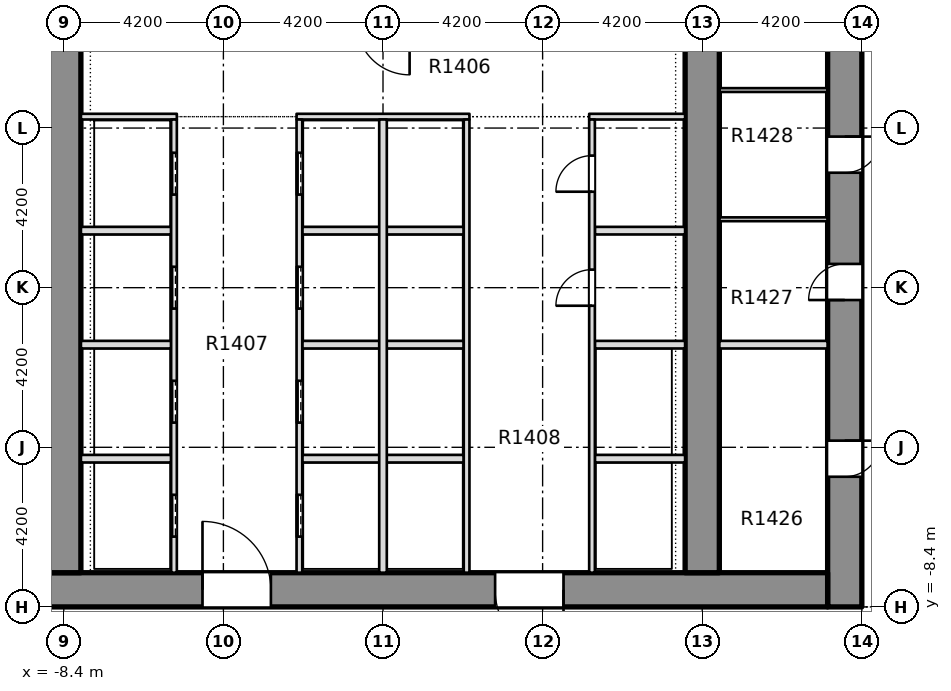
"""IFC4 building model, lengths in metres.
Left out: names, types, materials, properties, quantities, classifications, styles, units other than length and angle.
Written with IfcOpenShell. Run it as: python <this file> out.ifc"""

import sys

from ifc_helpers import new_model, si_unit, direction, frame, frame_2d, origin, place, context, subcontext, project, spatial, rectangle, extrude, element, fill, save


model = new_model("IFC4")
c1 = context("Model", 3, precision=1e-05, world=origin(), true_north=direction((0.0, 1.0)))
c2 = subcontext(c1, "Body", "Model", "MODEL_VIEW")
j1 = project(units=[si_unit("LENGTHUNIT", "METRE"), si_unit("PLANEANGLEUNIT", "RADIAN")], contexts=[c1])
p1 = place(None, origin())
s1 = spatial("IfcSite", under=j1, at=p1, CompositionType="ELEMENT")
p2 = place(p1, origin())
s2 = spatial("IfcBuilding", under=s1, at=p2, CompositionType="ELEMENT")
p3 = place(p2, frame((0.0, 0.0, 62.1)))
s3 = spatial("IfcBuildingStorey", under=s2, at=p3, CompositionType="ELEMENT", Elevation=62.1)
p4 = place(p3, frame((12.15, -8.4, -0.32), z_axis=(0.0, 0.0, 1.0), x_axis=(0.0, 1.0, 0.0)))
e1 = element("IfcWall", 1, at=p4, inside=s3, PredefinedType="SHEAR", context=c2, shape_type="SweptSolid", body=[
    extrude(rectangle(XDim=30.15, YDim=0.9, at=frame_2d((15.075, 0.0))), origin(), (0.0, 0.0, 1.0), 3.45),
])
p5 = place(p4, frame((3.425, 0.0, 0.32)))
e2 = element("IfcOpeningElement", 2, at=p5, cuts=e1, PredefinedType="OPENING", context=c2, shape_type="SweptSolid", body=[
    extrude(rectangle(XDim=0.95, YDim=2.1, at=frame_2d((0.475, 1.05))), frame((0.0, 0.46, 0.0), z_axis=(0.0, -1.0, 0.0), x_axis=(1.0, 0.0, 0.0)), (0.0, 0.0, 1.0), 0.92),
])
p6 = place(p4, frame((8.075, 0.0, 0.32)))
e3 = element("IfcOpeningElement", 3, at=p6, cuts=e1, PredefinedType="OPENING", context=c2, shape_type="SweptSolid", body=[
    extrude(rectangle(XDim=0.95, YDim=2.1, at=frame_2d((0.475, 1.05))), frame((0.0, 0.46, 0.0), z_axis=(0.0, -1.0, 0.0), x_axis=(1.0, 0.0, 0.0)), (0.0, 0.0, 1.0), 0.92),
])
p7 = place(p4, frame((11.425, 0.0, 0.32)))
e4 = element("IfcOpeningElement", 4, at=p7, cuts=e1, PredefinedType="OPENING", context=c2, shape_type="SweptSolid", body=[
    extrude(rectangle(XDim=0.95, YDim=2.1, at=frame_2d((0.475, 1.05))), frame((0.0, 0.46, 0.0), z_axis=(0.0, -1.0, 0.0), x_axis=(1.0, 0.0, 0.0)), (0.0, 0.0, 1.0), 0.92),
])
p8 = place(p4, frame((15.625, 0.0, 0.32)))
e5 = element("IfcOpeningElement", 5, at=p8, cuts=e1, PredefinedType="OPENING", context=c2, shape_type="SweptSolid", body=[
    extrude(rectangle(XDim=0.95, YDim=2.1, at=frame_2d((0.475, 1.05))), frame((0.0, 0.46, 0.0), z_axis=(0.0, -1.0, 0.0), x_axis=(1.0, 0.0, 0.0)), (0.0, 0.0, 1.0), 0.92),
])
p9 = place(p4, frame((22.725, 0.0, 0.32)))
e6 = element("IfcOpeningElement", 6, at=p9, cuts=e1, PredefinedType="OPENING", context=c2, shape_type="SweptSolid", body=[
    extrude(rectangle(XDim=0.95, YDim=2.1, at=frame_2d((0.475, 1.05))), frame((0.0, 0.46, 0.0), z_axis=(0.0, -1.0, 0.0), x_axis=(1.0, 0.0, 0.0)), (0.0, 0.0, 1.0), 0.92),
])
p10 = place(p4, frame((26.75, 0.0, 0.32)))
e7 = element("IfcOpeningElement", 7, at=p10, cuts=e1, PredefinedType="OPENING", context=c2, shape_type="SweptSolid", body=[
    extrude(rectangle(XDim=0.95, YDim=2.1, at=frame_2d((0.475, 1.05))), frame((0.0, 0.46, 0.0), z_axis=(0.0, -1.0, 0.0), x_axis=(1.0, 0.0, 0.0)), (0.0, 0.0, 1.0), 0.92),
])
p11 = place(p4, frame((19.3, 0.0, 0.32)))
e8 = element("IfcOpeningElement", 8, at=p11, cuts=e1, PredefinedType="OPENING", context=c2, shape_type="SweptSolid", body=[
    extrude(rectangle(XDim=1.2, YDim=2.1, at=frame_2d((0.6, 1.05))), frame((0.0, 0.46, 0.0), z_axis=(0.0, -1.0, 0.0), x_axis=(1.0, 0.0, 0.0)), (0.0, 0.0, 1.0), 0.92),
])
p12 = place(p3, frame((-11.7, -7.95, -0.32), z_axis=(0.0, 0.0, 1.0), x_axis=(1.0, 0.0, 0.0)))
e9 = element("IfcWall", 9, at=p12, inside=s3, PredefinedType="SHEAR", context=c2, shape_type="SweptSolid", body=[
    extrude(rectangle(XDim=23.4, YDim=0.9, at=frame_2d((11.7, 0.0))), origin(), (0.0, 0.0, 1.0), 3.45),
])
p13 = place(p12, frame((6.95, 0.0, 0.32)))
e10 = element("IfcOpeningElement", 10, at=p13, cuts=e9, PredefinedType="OPENING", context=c2, shape_type="SweptSolid", body=[
    extrude(rectangle(XDim=1.8, YDim=2.1, at=frame_2d((0.9, 1.05))), frame((0.0, 0.46, 0.0), z_axis=(0.0, -1.0, 0.0), x_axis=(1.0, 0.0, 0.0)), (0.0, 0.0, 1.0), 0.92),
])
p14 = place(p12, frame((14.65, 0.0, 0.32)))
e11 = element("IfcOpeningElement", 11, at=p14, cuts=e9, PredefinedType="OPENING", context=c2, shape_type="SweptSolid", body=[
    extrude(rectangle(XDim=1.8, YDim=2.1, at=frame_2d((0.9, 1.05))), frame((0.0, 0.46, 0.0), z_axis=(0.0, -1.0, 0.0), x_axis=(1.0, 0.0, 0.0)), (0.0, 0.0, 1.0), 0.92),
])
p15 = place(p3, frame((-8.4, -7.5, -0.32), z_axis=(0.0, 0.0, 1.0), x_axis=(0.0, 1.0, 0.0)))
e12 = element("IfcWall", 12, at=p15, inside=s3, PredefinedType="SHEAR", context=c2, shape_type="SweptSolid", body=[
    extrude(rectangle(XDim=28.35, YDim=0.9, at=frame_2d((14.175, 0.0))), origin(), (0.0, 0.0, 1.0), 3.45),
])
p16 = place(p15, frame((18.4, 0.0, 0.32)))
e13 = element("IfcOpeningElement", 13, at=p16, cuts=e12, PredefinedType="OPENING", context=c2, shape_type="SweptSolid", body=[
    extrude(rectangle(XDim=1.2, YDim=2.1, at=frame_2d((0.6, 1.05))), frame((0.0, 0.46, 0.0), z_axis=(0.0, -1.0, 0.0), x_axis=(1.0, 0.0, 0.0)), (0.0, 0.0, 1.0), 0.92),
])
p17 = place(p3, frame((8.4, -7.5, -0.32), z_axis=(0.0, 0.0, 1.0), x_axis=(0.0, 1.0, 0.0)))
e14 = element("IfcWall", 14, at=p17, inside=s3, PredefinedType="SHEAR", context=c2, shape_type="SweptSolid", body=[
    extrude(rectangle(XDim=28.35, YDim=0.9, at=frame_2d((14.175, 0.0))), origin(), (0.0, 0.0, 1.0), 3.45),
])
p18 = place(p17, frame((18.4, 0.0, 0.32)))
e15 = element("IfcOpeningElement", 15, at=p18, cuts=e14, PredefinedType="OPENING", context=c2, shape_type="SweptSolid", body=[
    extrude(rectangle(XDim=1.2, YDim=2.1, at=frame_2d((0.6, 1.05))), frame((0.0, 0.46, 0.0), z_axis=(0.0, -1.0, 0.0), x_axis=(1.0, 0.0, 0.0)), (0.0, 0.0, 1.0), 0.92),
])
p19 = place(p3, frame((-7.949, -4.5, 0.0), z_axis=(0.0, 0.0, 1.0), x_axis=(1.0, 0.0, 0.0)))
e16 = element("IfcWall", 16, at=p19, inside=s3, PredefinedType="PARTITIONING", context=c2, shape_type="SweptSolid", body=[
    extrude(rectangle(XDim=2.374, YDim=0.2, at=frame_2d((1.187, 0.0))), origin(), (0.0, 0.0, 1.0), 3.13),
])
p20 = place(p3, frame((-2.125, -4.5, 0.0), z_axis=(0.0, 0.0, 1.0), x_axis=(1.0, 0.0, 0.0)))
e17 = element("IfcWall", 17, at=p20, inside=s3, PredefinedType="PARTITIONING", context=c2, shape_type="SweptSolid", body=[
    extrude(rectangle(XDim=4.25, YDim=0.2, at=frame_2d((2.125, 0.0))), origin(), (0.0, 0.0, 1.0), 3.13),
])
for number, where, z_axis, x_axis in (
    (18, (5.575, -4.5, 0.0), (0.0, 0.0, 1.0), (1.0, 0.0, 0.0)),
    (19, (-7.949, -1.5, 0.0), (0.0, 0.0, 1.0), (1.0, 0.0, 0.0)),
):
    element("IfcWall", number, at=place(p3, frame(where, z_axis=z_axis, x_axis=x_axis)), inside=s3, PredefinedType="PARTITIONING", context=c2, shape_type="SweptSolid", body=[
        extrude(rectangle(XDim=2.374, YDim=0.2, at=frame_2d((1.187, 0.0))), origin(), (0.0, 0.0, 1.0), 3.13),
    ])
p21 = place(p3, frame((-2.125, -1.5, 0.0), z_axis=(0.0, 0.0, 1.0), x_axis=(1.0, 0.0, 0.0)))
e20 = element("IfcWall", 20, at=p21, inside=s3, PredefinedType="PARTITIONING", context=c2, shape_type="SweptSolid", body=[
    extrude(rectangle(XDim=4.25, YDim=0.2, at=frame_2d((2.125, 0.0))), origin(), (0.0, 0.0, 1.0), 3.13),
])
for number, where, z_axis, x_axis in (
    (21, (5.575, -1.5, 0.0), (0.0, 0.0, 1.0), (1.0, 0.0, 0.0)),
    (22, (-7.949, 1.5, 0.0), (0.0, 0.0, 1.0), (1.0, 0.0, 0.0)),
):
    element("IfcWall", number, at=place(p3, frame(where, z_axis=z_axis, x_axis=x_axis)), inside=s3, PredefinedType="PARTITIONING", context=c2, shape_type="SweptSolid", body=[
        extrude(rectangle(XDim=2.374, YDim=0.2, at=frame_2d((1.187, 0.0))), origin(), (0.0, 0.0, 1.0), 3.13),
    ])
p22 = place(p3, frame((-2.125, 1.5, 0.0), z_axis=(0.0, 0.0, 1.0), x_axis=(1.0, 0.0, 0.0)))
e23 = element("IfcWall", 23, at=p22, inside=s3, PredefinedType="PARTITIONING", context=c2, shape_type="SweptSolid", body=[
    extrude(rectangle(XDim=4.25, YDim=0.2, at=frame_2d((2.125, 0.0))), origin(), (0.0, 0.0, 1.0), 3.13),
])
p23 = place(p3, frame((5.575, 1.5, 0.0), z_axis=(0.0, 0.0, 1.0), x_axis=(1.0, 0.0, 0.0)))
e24 = element("IfcWall", 24, at=p23, inside=s3, PredefinedType="PARTITIONING", context=c2, shape_type="SweptSolid", body=[
    extrude(rectangle(XDim=2.374, YDim=0.2, at=frame_2d((1.187, 0.0))), origin(), (0.0, 0.0, 1.0), 3.13),
])
p24 = place(p3, frame((-7.949, 4.5, 0.0), z_axis=(0.0, 0.0, 1.0), x_axis=(1.0, 0.0, 0.0)))
e25 = element("IfcWall", 25, at=p24, inside=s3, PredefinedType="PARTITIONING", context=c2, shape_type="SweptSolid", body=[
    extrude(rectangle(XDim=2.524, YDim=0.15, at=frame_2d((1.262, 0.0))), origin(), (0.0, 0.0, 1.0), 3.13),
])
p25 = place(p3, frame((-2.275, 4.5, 0.0), z_axis=(0.0, 0.0, 1.0), x_axis=(1.0, 0.0, 0.0)))
e26 = element("IfcWall", 26, at=p25, inside=s3, PredefinedType="PARTITIONING", context=c2, shape_type="SweptSolid", body=[
    extrude(rectangle(XDim=4.55, YDim=0.15, at=frame_2d((2.275, 0.0))), origin(), (0.0, 0.0, 1.0), 3.13),
])
p26 = place(p3, frame((5.425, 4.5, 0.0), z_axis=(0.0, 0.0, 1.0), x_axis=(1.0, 0.0, 0.0)))
e27 = element("IfcWall", 27, at=p26, inside=s3, PredefinedType="PARTITIONING", context=c2, shape_type="SweptSolid", body=[
    extrude(rectangle(XDim=2.524, YDim=0.15, at=frame_2d((1.262, 0.0))), origin(), (0.0, 0.0, 1.0), 3.13),
])
p27 = place(p3, frame((-5.5, -7.499, 0.0), z_axis=(0.0, 0.0, 1.0), x_axis=(0.0, 1.0, 0.0)))
e28 = element("IfcWall", 28, at=p27, inside=s3, PredefinedType="PARTITIONING", context=c2, shape_type="SweptSolid", body=[
    extrude(rectangle(XDim=11.924, YDim=0.15, at=frame_2d((5.962, 0.0))), origin(), (0.0, 0.0, 1.0), 3.13),
])
p28 = place(p27, frame((0.949, 0.0, 0.0)))
e29 = element("IfcOpeningElement", 29, at=p28, cuts=e28, PredefinedType="OPENING", context=c2, shape_type="SweptSolid", body=[
    extrude(rectangle(XDim=1.1, YDim=2.1, at=frame_2d((0.55, 1.05))), frame((0.0, 0.085, 0.0), z_axis=(0.0, -1.0, 0.0), x_axis=(1.0, 0.0, 0.0)), (0.0, 0.0, 1.0), 0.17),
])
p29 = place(p27, frame((3.949, 0.0, 0.0)))
e30 = element("IfcOpeningElement", 30, at=p29, cuts=e28, PredefinedType="OPENING", context=c2, shape_type="SweptSolid", body=[
    extrude(rectangle(XDim=1.1, YDim=2.1, at=frame_2d((0.55, 1.05))), frame((0.0, 0.085, 0.0), z_axis=(0.0, -1.0, 0.0), x_axis=(1.0, 0.0, 0.0)), (0.0, 0.0, 1.0), 0.17),
])
p30 = place(p27, frame((6.949, 0.0, 0.0)))
e31 = element("IfcOpeningElement", 31, at=p30, cuts=e28, PredefinedType="OPENING", context=c2, shape_type="SweptSolid", body=[
    extrude(rectangle(XDim=1.1, YDim=2.1, at=frame_2d((0.55, 1.05))), frame((0.0, 0.085, 0.0), z_axis=(0.0, -1.0, 0.0), x_axis=(1.0, 0.0, 0.0)), (0.0, 0.0, 1.0), 0.17),
])
p31 = place(p27, frame((9.949, 0.0, 0.0)))
e32 = element("IfcOpeningElement", 32, at=p31, cuts=e28, PredefinedType="OPENING", context=c2, shape_type="SweptSolid", body=[
    extrude(rectangle(XDim=1.1, YDim=2.1, at=frame_2d((0.55, 1.05))), frame((0.0, 0.085, 0.0), z_axis=(0.0, -1.0, 0.0), x_axis=(1.0, 0.0, 0.0)), (0.0, 0.0, 1.0), 0.17),
])
p32 = place(p3, frame((-2.2, -7.499, 0.0), z_axis=(0.0, 0.0, 1.0), x_axis=(0.0, 1.0, 0.0)))
e33 = element("IfcWall", 33, at=p32, inside=s3, PredefinedType="PARTITIONING", context=c2, shape_type="SweptSolid", body=[
    extrude(rectangle(XDim=11.924, YDim=0.15, at=frame_2d((5.962, 0.0))), origin(), (0.0, 0.0, 1.0), 3.13),
])
p33 = place(p32, frame((0.949, 0.0, 0.0)))
e34 = element("IfcOpeningElement", 34, at=p33, cuts=e33, PredefinedType="OPENING", context=c2, shape_type="SweptSolid", body=[
    extrude(rectangle(XDim=1.1, YDim=2.1, at=frame_2d((0.55, 1.05))), frame((0.0, 0.085, 0.0), z_axis=(0.0, -1.0, 0.0), x_axis=(1.0, 0.0, 0.0)), (0.0, 0.0, 1.0), 0.17),
])
p34 = place(p32, frame((3.949, 0.0, 0.0)))
e35 = element("IfcOpeningElement", 35, at=p34, cuts=e33, PredefinedType="OPENING", context=c2, shape_type="SweptSolid", body=[
    extrude(rectangle(XDim=1.1, YDim=2.1, at=frame_2d((0.55, 1.05))), frame((0.0, 0.085, 0.0), z_axis=(0.0, -1.0, 0.0), x_axis=(1.0, 0.0, 0.0)), (0.0, 0.0, 1.0), 0.17),
])
p35 = place(p32, frame((6.949, 0.0, 0.0)))
e36 = element("IfcOpeningElement", 36, at=p35, cuts=e33, PredefinedType="OPENING", context=c2, shape_type="SweptSolid", body=[
    extrude(rectangle(XDim=1.1, YDim=2.1, at=frame_2d((0.55, 1.05))), frame((0.0, 0.085, 0.0), z_axis=(0.0, -1.0, 0.0), x_axis=(1.0, 0.0, 0.0)), (0.0, 0.0, 1.0), 0.17),
])
p36 = place(p32, frame((9.949, 0.0, 0.0)))
e37 = element("IfcOpeningElement", 37, at=p36, cuts=e33, PredefinedType="OPENING", context=c2, shape_type="SweptSolid", body=[
    extrude(rectangle(XDim=1.1, YDim=2.1, at=frame_2d((0.55, 1.05))), frame((0.0, 0.085, 0.0), z_axis=(0.0, -1.0, 0.0), x_axis=(1.0, 0.0, 0.0)), (0.0, 0.0, 1.0), 0.17),
])
p37 = place(p3, frame((0.0, -7.499, 0.0), z_axis=(0.0, 0.0, 1.0), x_axis=(0.0, 1.0, 0.0)))
e38 = element("IfcWall", 38, at=p37, inside=s3, PredefinedType="PARTITIONING", context=c2, shape_type="SweptSolid", body=[
    extrude(rectangle(XDim=11.924, YDim=0.2, at=frame_2d((5.962, 0.0))), origin(), (0.0, 0.0, 1.0), 3.13),
])
p38 = place(p3, frame((2.2, -7.499, 0.0), z_axis=(0.0, 0.0, 1.0), x_axis=(0.0, 1.0, 0.0)))
e39 = element("IfcWall", 39, at=p38, inside=s3, PredefinedType="PARTITIONING", context=c2, shape_type="SweptSolid", body=[
    extrude(rectangle(XDim=11.924, YDim=0.15, at=frame_2d((5.962, 0.0))), origin(), (0.0, 0.0, 1.0), 3.13),
])
p39 = place(p3, frame((5.5, -7.499, 0.0), z_axis=(0.0, 0.0, 1.0), x_axis=(0.0, 1.0, 0.0)))
e40 = element("IfcWall", 40, at=p39, inside=s3, PredefinedType="PARTITIONING", context=c2, shape_type="SweptSolid", body=[
    extrude(rectangle(XDim=11.924, YDim=0.15, at=frame_2d((5.962, 0.0))), origin(), (0.0, 0.0, 1.0), 3.13),
])
p40 = place(p39, frame((7.024, 0.0, 0.0)))
e41 = element("IfcOpeningElement", 41, at=p40, cuts=e40, PredefinedType="OPENING", context=c2, shape_type="SweptSolid", body=[
    extrude(rectangle(XDim=0.95, YDim=2.1, at=frame_2d((0.475, 1.05))), frame((0.0, 0.085, 0.0), z_axis=(0.0, -1.0, 0.0), x_axis=(1.0, 0.0, 0.0)), (0.0, 0.0, 1.0), 0.17),
])
p41 = place(p39, frame((10.024, 0.0, 0.0)))
e42 = element("IfcOpeningElement", 42, at=p41, cuts=e40, PredefinedType="OPENING", context=c2, shape_type="SweptSolid", body=[
    extrude(rectangle(XDim=0.95, YDim=2.1, at=frame_2d((0.475, 1.05))), frame((0.0, 0.085, 0.0), z_axis=(0.0, -1.0, 0.0), x_axis=(1.0, 0.0, 0.0)), (0.0, 0.0, 1.0), 0.17),
])
p42 = place(p3, frame((8.851, -1.5, 0.0), z_axis=(0.0, 0.0, 1.0), x_axis=(1.0, 0.0, 0.0)))
e43 = element("IfcWall", 43, at=p42, inside=s3, PredefinedType="PARTITIONING", context=c2, shape_type="SweptSolid", body=[
    extrude(rectangle(XDim=2.848, YDim=0.2, at=frame_2d((1.424, 0.0))), origin(), (0.0, 0.0, 1.0), 3.13),
])
for number, where, z_axis, x_axis in (
    (44, (8.851, 1.8, 0.0), (0.0, 0.0, 1.0), (1.0, 0.0, 0.0)),
    (45, (8.851, 5.2, 0.0), (0.0, 0.0, 1.0), (1.0, 0.0, 0.0)),
):
    element("IfcWall", number, at=place(p3, frame(where, z_axis=z_axis, x_axis=x_axis)), inside=s3, PredefinedType="PARTITIONING", context=c2, shape_type="SweptSolid", body=[
        extrude(rectangle(XDim=2.848, YDim=0.1, at=frame_2d((1.424, 0.0))), origin(), (0.0, 0.0, 1.0), 3.13),
    ])
p43 = place(p28, origin())
e46 = element("IfcDoor", 46, at=p43, inside=s3, OperationType="SLIDING_TO_RIGHT", PredefinedType="DOOR", context=c2, shape_type="SweptSolid", body=[
    extrude(rectangle(XDim=1.1, YDim=2.1, at=frame_2d((0.55, 1.05))), frame((0.0, 0.025, 0.0), z_axis=(0.0, -1.0, 0.0), x_axis=(1.0, 0.0, 0.0)), (0.0, 0.0, 1.0), 0.05),
])
fill(e29, e46)
p44 = place(p29, origin())
e47 = element("IfcDoor", 47, at=p44, inside=s3, OperationType="SLIDING_TO_RIGHT", PredefinedType="DOOR", context=c2, shape_type="SweptSolid", body=[
    extrude(rectangle(XDim=1.1, YDim=2.1, at=frame_2d((0.55, 1.05))), frame((0.0, 0.025, 0.0), z_axis=(0.0, -1.0, 0.0), x_axis=(1.0, 0.0, 0.0)), (0.0, 0.0, 1.0), 0.05),
])
fill(e30, e47)
p45 = place(p30, origin())
e48 = element("IfcDoor", 48, at=p45, inside=s3, OperationType="SLIDING_TO_RIGHT", PredefinedType="DOOR", context=c2, shape_type="SweptSolid", body=[
    extrude(rectangle(XDim=1.1, YDim=2.1, at=frame_2d((0.55, 1.05))), frame((0.0, 0.025, 0.0), z_axis=(0.0, -1.0, 0.0), x_axis=(1.0, 0.0, 0.0)), (0.0, 0.0, 1.0), 0.05),
])
fill(e31, e48)
p46 = place(p31, origin())
e49 = element("IfcDoor", 49, at=p46, inside=s3, OperationType="SLIDING_TO_RIGHT", PredefinedType="DOOR", context=c2, shape_type="SweptSolid", body=[
    extrude(rectangle(XDim=1.1, YDim=2.1, at=frame_2d((0.55, 1.05))), frame((0.0, 0.025, 0.0), z_axis=(0.0, -1.0, 0.0), x_axis=(1.0, 0.0, 0.0)), (0.0, 0.0, 1.0), 0.05),
])
fill(e32, e49)
p47 = place(p33, origin())
e50 = element("IfcDoor", 50, at=p47, inside=s3, OperationType="SLIDING_TO_RIGHT", PredefinedType="DOOR", context=c2, shape_type="SweptSolid", body=[
    extrude(rectangle(XDim=1.1, YDim=2.1, at=frame_2d((0.55, 1.05))), frame((0.0, 0.025, 0.0), z_axis=(0.0, -1.0, 0.0), x_axis=(1.0, 0.0, 0.0)), (0.0, 0.0, 1.0), 0.05),
])
fill(e34, e50)
p48 = place(p34, origin())
e51 = element("IfcDoor", 51, at=p48, inside=s3, OperationType="SLIDING_TO_RIGHT", PredefinedType="DOOR", context=c2, shape_type="SweptSolid", body=[
    extrude(rectangle(XDim=1.1, YDim=2.1, at=frame_2d((0.55, 1.05))), frame((0.0, 0.025, 0.0), z_axis=(0.0, -1.0, 0.0), x_axis=(1.0, 0.0, 0.0)), (0.0, 0.0, 1.0), 0.05),
])
fill(e35, e51)
p49 = place(p35, origin())
e52 = element("IfcDoor", 52, at=p49, inside=s3, OperationType="SLIDING_TO_RIGHT", PredefinedType="DOOR", context=c2, shape_type="SweptSolid", body=[
    extrude(rectangle(XDim=1.1, YDim=2.1, at=frame_2d((0.55, 1.05))), frame((0.0, 0.025, 0.0), z_axis=(0.0, -1.0, 0.0), x_axis=(1.0, 0.0, 0.0)), (0.0, 0.0, 1.0), 0.05),
])
fill(e36, e52)
p50 = place(p36, origin())
e53 = element("IfcDoor", 53, at=p50, inside=s3, OperationType="SLIDING_TO_RIGHT", PredefinedType="DOOR", context=c2, shape_type="SweptSolid", body=[
    extrude(rectangle(XDim=1.1, YDim=2.1, at=frame_2d((0.55, 1.05))), frame((0.0, 0.025, 0.0), z_axis=(0.0, -1.0, 0.0), x_axis=(1.0, 0.0, 0.0)), (0.0, 0.0, 1.0), 0.05),
])
fill(e37, e53)
p51 = place(p40, origin())
e54 = element("IfcDoor", 54, at=p51, inside=s3, OperationType="SINGLE_SWING_RIGHT", PredefinedType="DOOR", context=c2, shape_type="SweptSolid", body=[
    extrude(rectangle(XDim=0.95, YDim=2.1, at=frame_2d((0.475, 1.05))), frame((0.0, 0.025, 0.0), z_axis=(0.0, -1.0, 0.0), x_axis=(1.0, 0.0, 0.0)), (0.0, 0.0, 1.0), 0.05),
])
fill(e41, e54)
p52 = place(p41, origin())
e55 = element("IfcDoor", 55, at=p52, inside=s3, OperationType="SINGLE_SWING_RIGHT", PredefinedType="DOOR", context=c2, shape_type="SweptSolid", body=[
    extrude(rectangle(XDim=0.95, YDim=2.1, at=frame_2d((0.475, 1.05))), frame((0.0, 0.025, 0.0), z_axis=(0.0, -1.0, 0.0), x_axis=(1.0, 0.0, 0.0)), (0.0, 0.0, 1.0), 0.05),
])
fill(e42, e55)
p53 = place(p13, origin())
e56 = element("IfcDoor", 56, at=p53, inside=s3, OperationType="SINGLE_SWING_LEFT", PredefinedType="DOOR", context=c2, shape_type="SweptSolid", body=[
    extrude(rectangle(XDim=1.8, YDim=2.1, at=frame_2d((0.9, 1.05))), frame((0.0, 0.025, 0.0), z_axis=(0.0, -1.0, 0.0), x_axis=(1.0, 0.0, 0.0)), (0.0, 0.0, 1.0), 0.05),
])
fill(e10, e56)
p54 = place(p14, origin())
e57 = element("IfcDoor", 57, at=p54, inside=s3, OperationType="SINGLE_SWING_LEFT", PredefinedType="DOOR", context=c2, shape_type="SweptSolid", body=[
    extrude(rectangle(XDim=1.8, YDim=2.1, at=frame_2d((0.9, 1.05))), frame((0.0, 0.025, 0.0), z_axis=(0.0, -1.0, 0.0), x_axis=(1.0, 0.0, 0.0)), (0.0, 0.0, 1.0), 0.05),
])
fill(e11, e57)
p55 = place(p5, origin())
e58 = element("IfcDoor", 58, at=p55, inside=s3, OperationType="SINGLE_SWING_LEFT", PredefinedType="DOOR", context=c2, shape_type="SweptSolid", body=[
    extrude(rectangle(XDim=0.95, YDim=2.1, at=frame_2d((0.475, 1.05))), frame((0.0, 0.025, 0.0), z_axis=(0.0, -1.0, 0.0), x_axis=(1.0, 0.0, 0.0)), (0.0, 0.0, 1.0), 0.05),
])
fill(e2, e58)
p56 = place(p6, origin())
e59 = element("IfcDoor", 59, at=p56, inside=s3, OperationType="SINGLE_SWING_LEFT", PredefinedType="DOOR", context=c2, shape_type="SweptSolid", body=[
    extrude(rectangle(XDim=0.95, YDim=2.1, at=frame_2d((0.475, 1.05))), frame((0.0, 0.025, 0.0), z_axis=(0.0, -1.0, 0.0), x_axis=(1.0, 0.0, 0.0)), (0.0, 0.0, 1.0), 0.05),
])
fill(e3, e59)
p57 = place(p7, origin())
e60 = element("IfcDoor", 60, at=p57, inside=s3, OperationType="SINGLE_SWING_LEFT", PredefinedType="DOOR", context=c2, shape_type="SweptSolid", body=[
    extrude(rectangle(XDim=0.95, YDim=2.1, at=frame_2d((0.475, 1.05))), frame((0.0, 0.025, 0.0), z_axis=(0.0, -1.0, 0.0), x_axis=(1.0, 0.0, 0.0)), (0.0, 0.0, 1.0), 0.05),
])
fill(e4, e60)
save(model, sys.argv[1])
